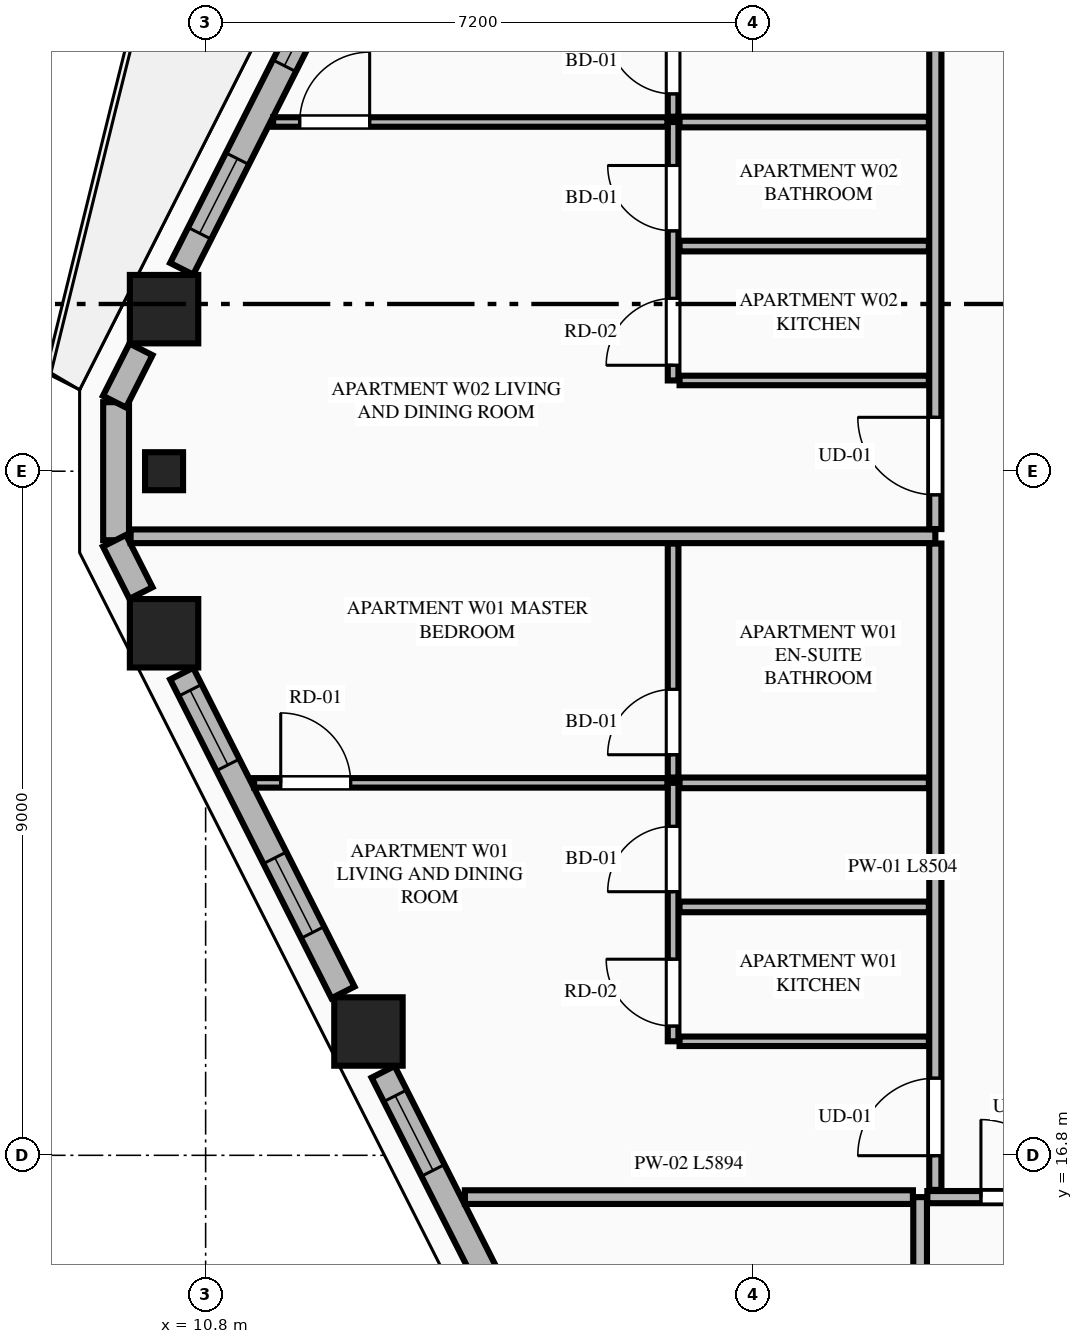
"""IFC4 building model, lengths in metres.
Left out: names, types, materials, properties, quantities, classifications, styles, units other than length and angle.
Written with IfcOpenShell. Run it as: python <this file> out.ifc"""

import sys

from ifc_helpers import new_model, si_unit, direction, frame, frame_2d, origin, origin_2d, place, context, subcontext, project, spatial, rectangle, extrude, element, fill, save


model = new_model("IFC4")
c1 = context("Model", 3, precision=1e-05, world=origin(), true_north=direction((0.0, 1.0)))
c2 = subcontext(c1, "Body", "Model", "MODEL_VIEW")
j1 = project(units=[si_unit("LENGTHUNIT", "METRE"), si_unit("PLANEANGLEUNIT", "RADIAN")], contexts=[c1])
p1 = place(None, origin())
s1 = spatial("IfcSite", under=j1, at=p1, CompositionType="ELEMENT")
p2 = place(p1, origin())
s2 = spatial("IfcBuilding", under=s1, at=p2, CompositionType="ELEMENT")
p3 = place(p2, frame((0.0, 0.0, 186.1)))
s3 = spatial("IfcBuildingStorey", under=s2, at=p3, CompositionType="ELEMENT", Elevation=186.1)
for number, where, z_axis, x_axis in (
    (1, (10.253, 27.932, 0.0), (0.0, 0.0, 1.0), (1.0, 0.0, 0.0)),
    (2, (10.253, 23.668, 0.0), (0.0, 0.0, 1.0), (1.0, 0.0, 0.0)),
    (3, (12.942, 18.429, 0.0), (0.0, 0.0, 1.0), (1.0, 0.0, 0.0)),
):
    element("IfcColumn", number, at=place(p3, frame(where, z_axis=z_axis, x_axis=x_axis)), inside=s3, PredefinedType="COLUMN", context=c2, shape_type="SweptSolid", body=[
        extrude(rectangle(XDim=0.9, YDim=0.9, at=origin_2d()), origin(), (0.0, 0.0, 1.0), 3.55),
    ])
p4 = place(p3, frame((10.253, 25.8, 0.0), z_axis=(0.0, 0.0, 1.0), x_axis=(0.0, -1.0, 0.0)))
e4 = element("IfcColumn", 4, at=p4, inside=s3, PredefinedType="PILASTER", context=c2, shape_type="SweptSolid", body=[
    extrude(rectangle(XDim=0.5, YDim=0.35, at=origin_2d()), origin(), (0.0, 0.0, 1.0), 3.55),
])
p5 = place(p3, frame((9.622, 26.708, 0.0), z_axis=(0.0, 0.0, 1.0), x_axis=(0.0, -1.0, 0.0)))
e5 = element("IfcWall", 5, at=p5, inside=s3, PredefinedType="STANDARD", context=c2, shape_type="SweptSolid", body=[
    extrude(rectangle(XDim=1.816, YDim=0.34, at=frame_2d((0.908, 0.0))), origin(), (0.0, 0.0, 1.0), 3.35),
])
p6 = place(p3, frame((12.607, 32.657, 0.0), z_axis=(0.0, 0.0, 1.0), x_axis=(-0.451426298588, -0.892308409096, 0.0)))
e6 = element("IfcWall", 6, at=p6, inside=s3, PredefinedType="STANDARD", context=c2, shape_type="SweptSolid", body=[
    extrude(rectangle(XDim=4.7, YDim=0.34, at=frame_2d((2.35, 0.0))), origin(), (0.0, 0.0, 1.0), 2.883),
])
p7 = place(p6, frame((0.607, 0.0, 0.75)))
e7 = element("IfcOpeningElement", 7, at=p7, cuts=e6, PredefinedType="OPENING", context=c2, shape_type="SweptSolid", body=[
    extrude(rectangle(XDim=1.1, YDim=1.983, at=frame_2d((0.55, 0.991))), frame((0.0, 0.18, 0.0), z_axis=(0.0, -1.0, 0.0), x_axis=(1.0, 0.0, 0.0)), (0.0, 0.0, 1.0), 0.36),
])
p8 = place(p6, frame((3.077, 0.0, 0.75)))
e8 = element("IfcOpeningElement", 8, at=p8, cuts=e6, PredefinedType="OPENING", context=c2, shape_type="SweptSolid", body=[
    extrude(rectangle(XDim=1.1, YDim=1.983, at=frame_2d((0.55, 0.991))), frame((0.0, 0.18, 0.0), z_axis=(0.0, -1.0, 0.0), x_axis=(1.0, 0.0, 0.0)), (0.0, 0.0, 1.0), 0.36),
])
for number, where, z_axis, x_axis in (
    (9, (9.949, 27.403, 0.0), (0.0, 0.0, 1.0), (-0.451, -0.892, 0.0)),
    (10, (9.601, 24.885, 0.0), (0.0, 0.0, 1.0), (0.451, -0.892, 0.0)),
):
    element("IfcWall", number, at=place(p3, frame(where, z_axis=z_axis, x_axis=x_axis)), inside=s3, PredefinedType="STANDARD", context=c2, shape_type="SweptSolid", body=[
        extrude(rectangle(XDim=0.771, YDim=0.34, at=frame_2d((0.385, 0.0))), origin(), (0.0, 0.0, 1.0), 3.35),
    ])
p9 = place(p3, frame((10.485, 23.137, 0.0), z_axis=(0.0, 0.0, 1.0), x_axis=(0.451447222193, -0.892297823361, 0.0)))
e11 = element("IfcWall", 11, at=p9, inside=s3, PredefinedType="STANDARD", context=c2, shape_type="SweptSolid", body=[
    extrude(rectangle(XDim=4.7, YDim=0.34, at=frame_2d((2.35, 0.0))), origin(), (0.0, 0.0, 1.0), 2.883),
])
p10 = place(p9, frame((0.246, 0.0, 0.75)))
e12 = element("IfcOpeningElement", 12, at=p10, cuts=e11, PredefinedType="OPENING", context=c2, shape_type="SweptSolid", body=[
    extrude(rectangle(XDim=1.1, YDim=1.983, at=frame_2d((0.55, 0.991))), frame((0.0, 0.18, 0.0), z_axis=(0.0, -1.0, 0.0), x_axis=(1.0, 0.0, 0.0)), (0.0, 0.0, 1.0), 0.36),
])
p11 = place(p9, frame((2.716, 0.0, 0.75)))
e13 = element("IfcOpeningElement", 13, at=p11, cuts=e11, PredefinedType="OPENING", context=c2, shape_type="SweptSolid", body=[
    extrude(rectangle(XDim=1.1, YDim=1.983, at=frame_2d((0.55, 0.991))), frame((0.0, 0.18, 0.0), z_axis=(0.0, -1.0, 0.0), x_axis=(1.0, 0.0, 0.0)), (0.0, 0.0, 1.0), 0.36),
])
p12 = place(p3, frame((13.135, 17.898, 0.0), z_axis=(0.0, 0.0, 1.0), x_axis=(0.451544279509, -0.892248711763, 0.0)))
e14 = element("IfcWall", 14, at=p12, inside=s3, PredefinedType="STANDARD", context=c2, shape_type="SweptSolid", body=[
    extrude(rectangle(XDim=4.91, YDim=0.34, at=frame_2d((2.455, 0.0))), origin(), (0.0, 0.0, 1.0), 2.883),
])
p13 = place(p12, frame((0.353, 0.0, 0.75)))
e15 = element("IfcOpeningElement", 15, at=p13, cuts=e14, PredefinedType="OPENING", context=c2, shape_type="SweptSolid", body=[
    extrude(rectangle(XDim=1.1, YDim=1.983, at=frame_2d((0.55, 0.991))), frame((0.0, 0.18, 0.0), z_axis=(0.0, -1.0, 0.0), x_axis=(1.0, 0.0, 0.0)), (0.0, 0.0, 1.0), 0.36),
])
p14 = place(p12, frame((2.959, 0.0, 0.75)))
e16 = element("IfcOpeningElement", 16, at=p14, cuts=e14, PredefinedType="OPENING", context=c2, shape_type="SweptSolid", body=[
    extrude(rectangle(XDim=1.1, YDim=1.983, at=frame_2d((0.55, 0.991))), frame((0.0, 0.18, 0.0), z_axis=(0.0, -1.0, 0.0), x_axis=(1.0, 0.0, 0.0)), (0.0, 0.0, 1.0), 0.36),
])
p15 = place(p3, frame((20.2, 5.968, 0.0), z_axis=(0.0, 0.0, 1.0), x_axis=(0.0, 1.0, 0.0)))
e17 = element("IfcWall", 17, at=p15, inside=s3, PredefinedType="PARTITIONING", context=c2, shape_type="SweptSolid", body=[
    extrude(rectangle(XDim=10.282, YDim=0.18, at=frame_2d((5.141, 0.0))), origin(), (0.0, 0.0, 1.0), 3.35),
])
p16 = place(p3, frame((20.295, 16.25, 0.0), z_axis=(0.0, 0.0, 1.0), x_axis=(1.0, 0.0, 0.0)))
e18 = element("IfcWall", 18, at=p16, inside=s3, PredefinedType="PARTITIONING", context=c2, shape_type="SweptSolid", body=[
    extrude(rectangle(XDim=8.467, YDim=0.16, at=frame_2d((4.233, 0.0))), origin(), (0.0, 0.0, 1.0), 3.35),
])
p17 = place(p16, frame((0.705, 0.0, 0.0)))
e19 = element("IfcOpeningElement", 19, at=p17, cuts=e18, PredefinedType="OPENING", context=c2, shape_type="SweptSolid", body=[
    extrude(rectangle(XDim=1.02, YDim=2.25, at=frame_2d((0.51, 1.125))), frame((0.0, 0.09, 0.0), z_axis=(0.0, -1.0, 0.0), x_axis=(1.0, 0.0, 0.0)), (0.0, 0.0, 1.0), 0.18),
])
p18 = place(p3, frame((14.211, 16.25, 0.0), z_axis=(0.0, 0.0, 1.0), x_axis=(1.0, 0.0, 0.0)))
e20 = element("IfcWall", 20, at=p18, inside=s3, PredefinedType="PARTITIONING", context=c2, shape_type="SweptSolid", body=[
    extrude(rectangle(XDim=5.894, YDim=0.18, at=frame_2d((2.947, 0.0))), origin(), (0.0, 0.0, 1.0), 3.35),
])
p19 = place(p3, frame((20.4, 16.345, 0.0), z_axis=(0.0, 0.0, 1.0), x_axis=(0.0, 1.0, 0.0)))
e21 = element("IfcWall", 21, at=p19, inside=s3, PredefinedType="PARTITIONING", context=c2, shape_type="SweptSolid", body=[
    extrude(rectangle(XDim=8.504, YDim=0.16, at=frame_2d((4.252, 0.0))), origin(), (0.0, 0.0, 1.0), 3.35),
])
p20 = place(p19, frame((0.45, 0.0, 0.0)))
e22 = element("IfcOpeningElement", 22, at=p20, cuts=e21, PredefinedType="OPENING", context=c2, shape_type="SweptSolid", body=[
    extrude(rectangle(XDim=1.02, YDim=2.25, at=frame_2d((0.51, 1.125))), frame((0.0, 0.09, 0.0), z_axis=(0.0, -1.0, 0.0), x_axis=(1.0, 0.0, 0.0)), (0.0, 0.0, 1.0), 0.18),
])
p21 = place(p3, frame((17.035, 18.3, 0.0), z_axis=(0.0, 0.0, 1.0), x_axis=(1.0, 0.0, 0.0)))
e23 = element("IfcWall", 23, at=p21, inside=s3, PredefinedType="PARTITIONING", context=c2, shape_type="SweptSolid", body=[
    extrude(rectangle(XDim=3.28, YDim=0.125, at=frame_2d((1.64, 0.0))), origin(), (0.0, 0.0, 1.0), 2.807),
])
p22 = place(p3, frame((16.95, 18.3, 0.0), z_axis=(0.0, 0.0, 1.0), x_axis=(0.0, 1.0, 0.0)))
e24 = element("IfcWall", 24, at=p22, inside=s3, PredefinedType="PLUMBINGWALL", context=c2, shape_type="SweptSolid", body=[
    extrude(rectangle(XDim=3.4, YDim=0.14, at=frame_2d((1.7, 0.0))), origin(), (0.0, 0.0, 1.0), 3.35),
])
p23 = place(p22, frame((0.2, 0.0, 0.0)))
e25 = element("IfcOpeningElement", 25, at=p23, cuts=e24, PredefinedType="OPENING", context=c2, shape_type="SweptSolid", body=[
    extrude(rectangle(XDim=0.88, YDim=2.15, at=frame_2d((0.44, 1.075))), frame((0.0, 0.08, 0.0), z_axis=(0.0, -1.0, 0.0), x_axis=(1.0, 0.0, 0.0)), (0.0, 0.0, 1.0), 0.16),
])
p24 = place(p22, frame((1.968, 0.0, 0.0)))
e26 = element("IfcOpeningElement", 26, at=p24, cuts=e24, PredefinedType="OPENING", context=c2, shape_type="SweptSolid", body=[
    extrude(rectangle(XDim=0.86, YDim=2.1, at=frame_2d((0.43, 1.05))), frame((0.0, 0.08, 0.0), z_axis=(0.0, -1.0, 0.0), x_axis=(1.0, 0.0, 0.0)), (0.0, 0.0, 1.0), 0.16),
])
p25 = place(p3, frame((16.95, 21.77, 0.0), z_axis=(0.0, 0.0, 1.0), x_axis=(0.0, 1.0, 0.0)))
e27 = element("IfcWall", 27, at=p25, inside=s3, PredefinedType="PLUMBINGWALL", context=c2, shape_type="SweptSolid", body=[
    extrude(rectangle(XDim=3.079, YDim=0.14, at=frame_2d((1.54, 0.0))), origin(), (0.0, 0.0, 1.0), 3.35),
])
p26 = place(p25, frame((0.3, 0.0, 0.0)))
e28 = element("IfcOpeningElement", 28, at=p26, cuts=e27, PredefinedType="OPENING", context=c2, shape_type="SweptSolid", body=[
    extrude(rectangle(XDim=0.86, YDim=2.1, at=frame_2d((0.43, 1.05))), frame((0.0, 0.08, 0.0), z_axis=(0.0, -1.0, 0.0), x_axis=(1.0, 0.0, 0.0)), (0.0, 0.0, 1.0), 0.16),
])
p27 = place(p3, frame((17.035, 21.7, 0.0), z_axis=(0.0, 0.0, 1.0), x_axis=(1.0, 0.0, 0.0)))
e29 = element("IfcWall", 29, at=p27, inside=s3, PredefinedType="PLUMBINGWALL", context=c2, shape_type="SweptSolid", body=[
    extrude(rectangle(XDim=3.28, YDim=0.14, at=frame_2d((1.64, 0.0))), origin(), (0.0, 0.0, 1.0), 3.35),
])
p28 = place(p3, frame((11.438, 21.7, 0.0), z_axis=(0.0, 0.0, 1.0), x_axis=(1.0, 0.0, 0.0)))
e30 = element("IfcWall", 30, at=p28, inside=s3, PredefinedType="PARTITIONING", context=c2, shape_type="SweptSolid", body=[
    extrude(rectangle(XDim=5.437, YDim=0.125, at=frame_2d((2.719, 0.0))), origin(), (0.0, 0.0, 1.0), 3.35),
])
p29 = place(p28, frame((0.35, 0.0, 0.0)))
e31 = element("IfcOpeningElement", 31, at=p29, cuts=e30, PredefinedType="OPENING", context=c2, shape_type="SweptSolid", body=[
    extrude(rectangle(XDim=0.92, YDim=2.15, at=frame_2d((0.46, 1.075))), frame((0.0, 0.073, 0.0), z_axis=(0.0, -1.0, 0.0), x_axis=(1.0, 0.0, 0.0)), (0.0, 0.0, 1.0), 0.145),
])
p30 = place(p3, frame((17.035, 20.068, 0.0), z_axis=(0.0, 0.0, 1.0), x_axis=(1.0, 0.0, 0.0)))
e32 = element("IfcWall", 32, at=p30, inside=s3, PredefinedType="PLUMBINGWALL", context=c2, shape_type="SweptSolid", body=[
    extrude(rectangle(XDim=3.28, YDim=0.14, at=frame_2d((1.64, 0.0))), origin(), (0.0, 0.0, 1.0), 3.35),
])
p31 = place(p3, frame((9.813, 24.944, 0.0), z_axis=(0.0, 0.0, 1.0), x_axis=(1.0, 0.0, 0.0)))
e33 = element("IfcWall", 33, at=p31, inside=s3, PredefinedType="PARTITIONING", context=c2, shape_type="SweptSolid", body=[
    extrude(rectangle(XDim=10.587, YDim=0.18, at=frame_2d((5.293, 0.0))), origin(), (0.0, 0.0, 1.0), 3.35),
])
p32 = place(p3, frame((20.4, 25.039, 0.0), z_axis=(0.0, 0.0, 1.0), x_axis=(0.0, 1.0, 0.0)))
e34 = element("IfcWall", 34, at=p32, inside=s3, PredefinedType="PARTITIONING", context=c2, shape_type="SweptSolid", body=[
    extrude(rectangle(XDim=10.016, YDim=0.16, at=frame_2d((5.008, 0.0))), origin(), (0.0, 0.0, 1.0), 3.35),
])
p33 = place(p32, frame((0.45, 0.0, 0.0)))
e35 = element("IfcOpeningElement", 35, at=p33, cuts=e34, PredefinedType="OPENING", context=c2, shape_type="SweptSolid", body=[
    extrude(rectangle(XDim=1.02, YDim=2.25, at=frame_2d((0.51, 1.125))), frame((0.0, 0.09, 0.0), z_axis=(0.0, -1.0, 0.0), x_axis=(1.0, 0.0, 0.0)), (0.0, 0.0, 1.0), 0.18),
])
p34 = place(p3, frame((17.035, 26.994, 0.0), z_axis=(0.0, 0.0, 1.0), x_axis=(1.0, 0.0, 0.0)))
e36 = element("IfcWall", 36, at=p34, inside=s3, PredefinedType="PARTITIONING", context=c2, shape_type="SweptSolid", body=[
    extrude(rectangle(XDim=3.28, YDim=0.125, at=frame_2d((1.64, 0.0))), origin(), (0.0, 0.0, 1.0), 3.35),
])
p35 = place(p3, frame((16.95, 26.994, 0.0), z_axis=(0.0, 0.0, 1.0), x_axis=(0.0, 1.0, 0.0)))
e37 = element("IfcWall", 37, at=p35, inside=s3, PredefinedType="PLUMBINGWALL", context=c2, shape_type="SweptSolid", body=[
    extrude(rectangle(XDim=3.4, YDim=0.14, at=frame_2d((1.7, 0.0))), origin(), (0.0, 0.0, 1.0), 3.35),
])
p36 = place(p35, frame((0.2, 0.0, 0.0)))
e38 = element("IfcOpeningElement", 38, at=p36, cuts=e37, PredefinedType="OPENING", context=c2, shape_type="SweptSolid", body=[
    extrude(rectangle(XDim=0.88, YDim=2.15, at=frame_2d((0.44, 1.075))), frame((0.0, 0.08, 0.0), z_axis=(0.0, -1.0, 0.0), x_axis=(1.0, 0.0, 0.0)), (0.0, 0.0, 1.0), 0.16),
])
p37 = place(p35, frame((1.968, 0.0, 0.0)))
e39 = element("IfcOpeningElement", 39, at=p37, cuts=e37, PredefinedType="OPENING", context=c2, shape_type="SweptSolid", body=[
    extrude(rectangle(XDim=0.86, YDim=2.1, at=frame_2d((0.43, 1.05))), frame((0.0, 0.08, 0.0), z_axis=(0.0, -1.0, 0.0), x_axis=(1.0, 0.0, 0.0)), (0.0, 0.0, 1.0), 0.16),
])
p38 = place(p3, frame((16.95, 30.464, 0.0), z_axis=(0.0, 0.0, 1.0), x_axis=(0.0, 1.0, 0.0)))
e40 = element("IfcWall", 40, at=p38, inside=s3, PredefinedType="PLUMBINGWALL", context=c2, shape_type="SweptSolid", body=[
    extrude(rectangle(XDim=4.591, YDim=0.14, at=frame_2d((2.295, 0.0))), origin(), (0.0, 0.0, 1.0), 3.35),
])
p39 = place(p38, frame((0.3, 0.0, 0.0)))
e41 = element("IfcOpeningElement", 41, at=p39, cuts=e40, PredefinedType="OPENING", context=c2, shape_type="SweptSolid", body=[
    extrude(rectangle(XDim=0.86, YDim=2.1, at=frame_2d((0.43, 1.05))), frame((0.0, 0.08, 0.0), z_axis=(0.0, -1.0, 0.0), x_axis=(1.0, 0.0, 0.0)), (0.0, 0.0, 1.0), 0.16),
])
p40 = place(p3, frame((17.035, 30.394, 0.0), z_axis=(0.0, 0.0, 1.0), x_axis=(1.0, 0.0, 0.0)))
e42 = element("IfcWall", 42, at=p40, inside=s3, PredefinedType="PLUMBINGWALL", context=c2, shape_type="SweptSolid", body=[
    extrude(rectangle(XDim=3.28, YDim=0.14, at=frame_2d((1.64, 0.0))), origin(), (0.0, 0.0, 1.0), 3.35),
])
p41 = place(p3, frame((11.688, 30.394, 0.0), z_axis=(0.0, 0.0, 1.0), x_axis=(1.0, 0.0, 0.0)))
e43 = element("IfcWall", 43, at=p41, inside=s3, PredefinedType="PARTITIONING", context=c2, shape_type="SweptSolid", body=[
    extrude(rectangle(XDim=5.187, YDim=0.125, at=frame_2d((2.594, 0.0))), origin(), (0.0, 0.0, 1.0), 3.35),
])
p42 = place(p41, frame((0.35, 0.0, 0.0)))
e44 = element("IfcOpeningElement", 44, at=p42, cuts=e43, PredefinedType="OPENING", context=c2, shape_type="SweptSolid", body=[
    extrude(rectangle(XDim=0.92, YDim=2.15, at=frame_2d((0.46, 1.075))), frame((0.0, 0.073, 0.0), z_axis=(0.0, -1.0, 0.0), x_axis=(1.0, 0.0, 0.0)), (0.0, 0.0, 1.0), 0.145),
])
p43 = place(p3, frame((17.035, 28.762, 0.0), z_axis=(0.0, 0.0, 1.0), x_axis=(1.0, 0.0, 0.0)))
e45 = element("IfcWall", 45, at=p43, inside=s3, PredefinedType="PLUMBINGWALL", context=c2, shape_type="SweptSolid", body=[
    extrude(rectangle(XDim=3.28, YDim=0.14, at=frame_2d((1.64, 0.0))), origin(), (0.0, 0.0, 1.0), 3.35),
])
p44 = place(p7, origin())
e46 = element("IfcWindow", 46, at=p44, inside=s3, PartitioningType="SINGLE_PANEL", PredefinedType="WINDOW", context=c2, shape_type="SweptSolid", body=[
    extrude(rectangle(XDim=1.1, YDim=1.983, at=frame_2d((0.55, 0.991))), frame((0.0, 0.03, 0.0), z_axis=(0.0, -1.0, 0.0), x_axis=(1.0, 0.0, 0.0)), (0.0, 0.0, 1.0), 0.06),
])
fill(e7, e46)
p45 = place(p10, origin())
e47 = element("IfcWindow", 47, at=p45, inside=s3, PartitioningType="SINGLE_PANEL", PredefinedType="WINDOW", context=c2, shape_type="SweptSolid", body=[
    extrude(rectangle(XDim=1.1, YDim=1.983, at=frame_2d((0.55, 0.991))), frame((0.0, 0.03, 0.0), z_axis=(0.0, -1.0, 0.0), x_axis=(1.0, 0.0, 0.0)), (0.0, 0.0, 1.0), 0.06),
])
fill(e12, e47)
p46 = place(p13, origin())
e48 = element("IfcWindow", 48, at=p46, inside=s3, PartitioningType="SINGLE_PANEL", PredefinedType="WINDOW", context=c2, shape_type="SweptSolid", body=[
    extrude(rectangle(XDim=1.1, YDim=1.983, at=frame_2d((0.55, 0.991))), frame((0.0, 0.03, 0.0), z_axis=(0.0, -1.0, 0.0), x_axis=(1.0, 0.0, 0.0)), (0.0, 0.0, 1.0), 0.06),
])
fill(e15, e48)
p47 = place(p17, origin())
e49 = element("IfcDoor", 49, at=p47, inside=s3, OperationType="SINGLE_SWING_LEFT", PredefinedType="DOOR", context=c2, shape_type="SweptSolid", body=[
    extrude(rectangle(XDim=1.02, YDim=2.25, at=frame_2d((0.51, 1.125))), frame((0.0, 0.025, 0.0), z_axis=(0.0, -1.0, 0.0), x_axis=(1.0, 0.0, 0.0)), (0.0, 0.0, 1.0), 0.05),
])
fill(e19, e49)
p48 = place(p23, origin())
e50 = element("IfcDoor", 50, at=p48, inside=s3, OperationType="SINGLE_SWING_RIGHT", PredefinedType="DOOR", context=c2, shape_type="SweptSolid", body=[
    extrude(rectangle(XDim=0.88, YDim=2.15, at=frame_2d((0.44, 1.075))), frame((0.0, 0.025, 0.0), z_axis=(0.0, -1.0, 0.0), x_axis=(1.0, 0.0, 0.0)), (0.0, 0.0, 1.0), 0.05),
])
fill(e25, e50)
p49 = place(p24, origin())
e51 = element("IfcDoor", 51, at=p49, inside=s3, OperationType="SINGLE_SWING_LEFT", PredefinedType="DOOR", context=c2, shape_type="SweptSolid", body=[
    extrude(rectangle(XDim=0.86, YDim=2.1, at=frame_2d((0.43, 1.05))), frame((0.0, 0.025, 0.0), z_axis=(0.0, -1.0, 0.0), x_axis=(1.0, 0.0, 0.0)), (0.0, 0.0, 1.0), 0.05),
])
fill(e26, e51)
p50 = place(p26, origin())
e52 = element("IfcDoor", 52, at=p50, inside=s3, OperationType="SINGLE_SWING_LEFT", PredefinedType="DOOR", context=c2, shape_type="SweptSolid", body=[
    extrude(rectangle(XDim=0.86, YDim=2.1, at=frame_2d((0.43, 1.05))), frame((0.0, 0.025, 0.0), z_axis=(0.0, -1.0, 0.0), x_axis=(1.0, 0.0, 0.0)), (0.0, 0.0, 1.0), 0.05),
])
fill(e28, e52)
p51 = place(p20, origin())
e53 = element("IfcDoor", 53, at=p51, inside=s3, OperationType="SINGLE_SWING_LEFT", PredefinedType="DOOR", context=c2, shape_type="SweptSolid", body=[
    extrude(rectangle(XDim=1.02, YDim=2.25, at=frame_2d((0.51, 1.125))), frame((0.0, 0.025, 0.0), z_axis=(0.0, -1.0, 0.0), x_axis=(1.0, 0.0, 0.0)), (0.0, 0.0, 1.0), 0.05),
])
fill(e22, e53)
p52 = place(p29, origin())
e54 = element("IfcDoor", 54, at=p52, inside=s3, OperationType="SINGLE_SWING_LEFT", PredefinedType="DOOR", context=c2, shape_type="SweptSolid", body=[
    extrude(rectangle(XDim=0.92, YDim=2.15, at=frame_2d((0.46, 1.075))), frame((0.0, 0.025, 0.0), z_axis=(0.0, -1.0, 0.0), x_axis=(1.0, 0.0, 0.0)), (0.0, 0.0, 1.0), 0.05),
])
fill(e31, e54)
p53 = place(p36, origin())
e55 = element("IfcDoor", 55, at=p53, inside=s3, OperationType="SINGLE_SWING_LEFT", PredefinedType="DOOR", context=c2, shape_type="SweptSolid", body=[
    extrude(rectangle(XDim=0.88, YDim=2.15, at=frame_2d((0.44, 1.075))), frame((0.0, 0.025, 0.0), z_axis=(0.0, -1.0, 0.0), x_axis=(1.0, 0.0, 0.0)), (0.0, 0.0, 1.0), 0.05),
])
fill(e38, e55)
p54 = place(p37, origin())
e56 = element("IfcDoor", 56, at=p54, inside=s3, OperationType="SINGLE_SWING_RIGHT", PredefinedType="DOOR", context=c2, shape_type="SweptSolid", body=[
    extrude(rectangle(XDim=0.86, YDim=2.1, at=frame_2d((0.43, 1.05))), frame((0.0, 0.025, 0.0), z_axis=(0.0, -1.0, 0.0), x_axis=(1.0, 0.0, 0.0)), (0.0, 0.0, 1.0), 0.05),
])
fill(e39, e56)
p55 = place(p39, origin())
e57 = element("IfcDoor", 57, at=p55, inside=s3, OperationType="SINGLE_SWING_RIGHT", PredefinedType="DOOR", context=c2, shape_type="SweptSolid", body=[
    extrude(rectangle(XDim=0.86, YDim=2.1, at=frame_2d((0.43, 1.05))), frame((0.0, 0.025, 0.0), z_axis=(0.0, -1.0, 0.0), x_axis=(1.0, 0.0, 0.0)), (0.0, 0.0, 1.0), 0.05),
])
fill(e41, e57)
p56 = place(p33, origin())
e58 = element("IfcDoor", 58, at=p56, inside=s3, OperationType="SINGLE_SWING_RIGHT", PredefinedType="DOOR", context=c2, shape_type="SweptSolid", body=[
    extrude(rectangle(XDim=1.02, YDim=2.25, at=frame_2d((0.51, 1.125))), frame((0.0, 0.025, 0.0), z_axis=(0.0, -1.0, 0.0), x_axis=(1.0, 0.0, 0.0)), (0.0, 0.0, 1.0), 0.05),
])
fill(e35, e58)
p57 = place(p42, origin())
e59 = element("IfcDoor", 59, at=p57, inside=s3, OperationType="SINGLE_SWING_RIGHT", PredefinedType="DOOR", context=c2, shape_type="SweptSolid", body=[
    extrude(rectangle(XDim=0.92, YDim=2.15, at=frame_2d((0.46, 1.075))), frame((0.0, 0.025, 0.0), z_axis=(0.0, -1.0, 0.0), x_axis=(1.0, 0.0, 0.0)), (0.0, 0.0, 1.0), 0.05),
])
fill(e44, e59)
p58 = place(p8, origin())
e60 = element("IfcWindow", 60, at=p58, inside=s3, PartitioningType="SINGLE_PANEL", PredefinedType="WINDOW", context=c2, shape_type="SweptSolid", body=[
    extrude(rectangle(XDim=1.1, YDim=1.983, at=frame_2d((0.55, 0.991))), frame((0.0, 0.03, 0.0), z_axis=(0.0, -1.0, 0.0), x_axis=(1.0, 0.0, 0.0)), (0.0, 0.0, 1.0), 0.06),
])
fill(e8, e60)
p59 = place(p11, origin())
e61 = element("IfcWindow", 61, at=p59, inside=s3, PartitioningType="SINGLE_PANEL", PredefinedType="WINDOW", context=c2, shape_type="SweptSolid", body=[
    extrude(rectangle(XDim=1.1, YDim=1.983, at=frame_2d((0.55, 0.991))), frame((0.0, 0.03, 0.0), z_axis=(0.0, -1.0, 0.0), x_axis=(1.0, 0.0, 0.0)), (0.0, 0.0, 1.0), 0.06),
])
fill(e13, e61)
save(model, sys.argv[1])
